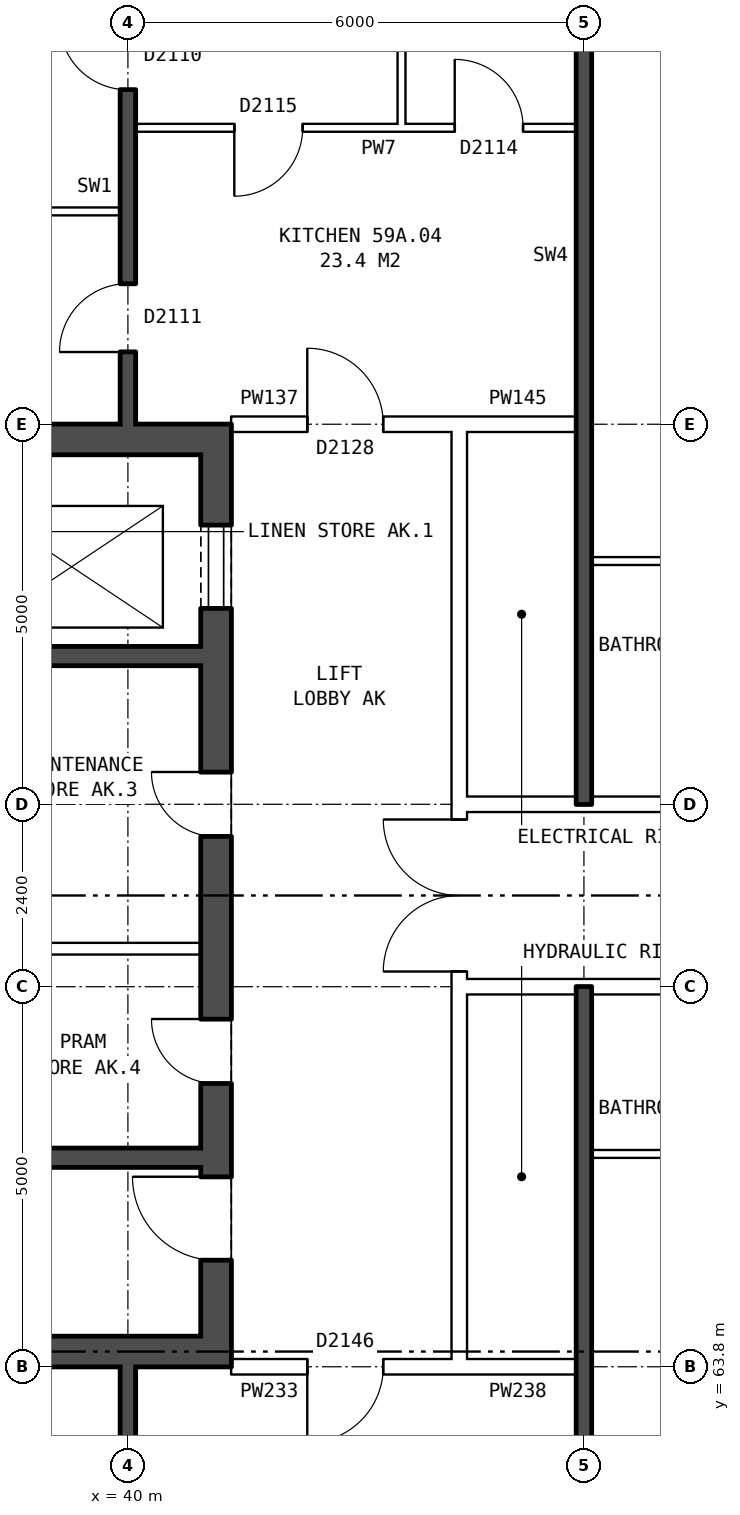
"""IFC4 building model, lengths in metres.
Left out: names, types, materials, properties, quantities, classifications, styles, units other than length and angle.
Written with IfcOpenShell. Run it as: python <this file> out.ifc"""

import sys

from ifc_helpers import new_model, si_unit, direction, frame, frame_2d, origin, place, context, subcontext, project, spatial, rectangle, extrude, element, fill, save


model = new_model("IFC4")
c1 = context("Model", 3, precision=1e-05, world=origin(), true_north=direction((0.0, 1.0)))
c2 = subcontext(c1, "Body", "Model", "MODEL_VIEW")
j1 = project(units=[si_unit("LENGTHUNIT", "METRE"), si_unit("PLANEANGLEUNIT", "RADIAN")], contexts=[c1])
p1 = place(None, origin())
s1 = spatial("IfcSite", under=j1, at=p1, CompositionType="ELEMENT")
p2 = place(p1, origin())
s2 = spatial("IfcBuilding", under=s1, at=p2, CompositionType="ELEMENT")
p3 = place(p2, frame((0.0, 0.0, 209.0)))
s3 = spatial("IfcBuildingStorey", under=s2, at=p3, CompositionType="ELEMENT", Elevation=209.0)
p4 = place(p3, frame((41.16, 76.2, 0.0), z_axis=(0.0, 0.0, 1.0), x_axis=(0.0, -1.0, 0.0)))
e1 = element("IfcWall", 1, at=p4, inside=s3, PredefinedType="SHEAR", context=c2, shape_type="SweptSolid", body=[
    extrude(rectangle(XDim=12.4, YDim=0.4, at=frame_2d((6.2, 0.0))), origin(), (0.0, 0.0, 1.0), 2.85),
])
p5 = place(p4, frame((1.325, 0.0, 0.0)))
e2 = element("IfcOpeningElement", 2, at=p5, cuts=e1, PredefinedType="OPENING", context=c2, shape_type="SweptSolid", body=[
    extrude(rectangle(XDim=1.1, YDim=2.1, at=frame_2d((0.55, 1.05))), frame((0.0, 0.21, 0.0), z_axis=(0.0, -1.0, 0.0), x_axis=(1.0, 0.0, 0.0)), (0.0, 0.0, 1.0), 0.42),
])
p6 = place(p4, frame((4.575, 0.0, 0.0)))
e3 = element("IfcOpeningElement", 3, at=p6, cuts=e1, PredefinedType="OPENING", context=c2, shape_type="SweptSolid", body=[
    extrude(rectangle(XDim=0.85, YDim=2.1, at=frame_2d((0.425, 1.05))), frame((0.0, 0.21, 0.0), z_axis=(0.0, -1.0, 0.0), x_axis=(1.0, 0.0, 0.0)), (0.0, 0.0, 1.0), 0.42),
])
p7 = place(p4, frame((7.825, 0.0, 0.0)))
e4 = element("IfcOpeningElement", 4, at=p7, cuts=e1, PredefinedType="OPENING", context=c2, shape_type="SweptSolid", body=[
    extrude(rectangle(XDim=0.85, YDim=2.1, at=frame_2d((0.425, 1.05))), frame((0.0, 0.21, 0.0), z_axis=(0.0, -1.0, 0.0), x_axis=(1.0, 0.0, 0.0)), (0.0, 0.0, 1.0), 0.42),
])
p8 = place(p4, frame((9.9, 0.0, 0.0)))
e5 = element("IfcOpeningElement", 5, at=p8, cuts=e1, PredefinedType="OPENING", context=c2, shape_type="SweptSolid", body=[
    extrude(rectangle(XDim=1.1, YDim=2.1, at=frame_2d((0.55, 1.05))), frame((0.0, 0.21, 0.0), z_axis=(0.0, -1.0, 0.0), x_axis=(1.0, 0.0, 0.0)), (0.0, 0.0, 1.0), 0.42),
])
for number, where, z_axis, x_axis in (
    (6, (40.96, 76.0, 0.0), (0.0, 0.0, 1.0), (-1.0, 0.0, 0.0)),
    (7, (40.96, 64.0, 0.0), (0.0, 0.0, 1.0), (-1.0, 0.0, 0.0)),
):
    element("IfcWall", number, at=place(p3, frame(where, z_axis=z_axis, x_axis=x_axis)), inside=s3, PredefinedType="SHEAR", context=c2, shape_type="SweptSolid", body=[
        extrude(rectangle(XDim=8.2, YDim=0.4, at=frame_2d((4.1, 0.0))), origin(), (0.0, 0.0, 1.0), 2.85),
    ])
p9 = place(p3, frame((40.96, 73.15, 0.0), z_axis=(0.0, 0.0, 1.0), x_axis=(-1.0, 0.0, 0.0)))
e8 = element("IfcWall", 8, at=p9, inside=s3, PredefinedType="SHEAR", context=c2, shape_type="SweptSolid", body=[
    extrude(rectangle(XDim=3.595, YDim=0.25, at=frame_2d((1.797, 0.0))), origin(), (0.0, 0.0, 1.0), 2.85),
])
p10 = place(p3, frame((40.96, 69.3, 0.0), z_axis=(0.0, 0.0, 1.0), x_axis=(-1.0, 0.0, 0.0)))
e9 = element("IfcWall", 9, at=p10, inside=s3, PredefinedType="PARTITIONING", context=c2, shape_type="SweptSolid", body=[
    extrude(rectangle(XDim=2.525, YDim=0.15, at=frame_2d((1.262, 0.0))), origin(), (0.0, 0.0, 1.0), 2.85),
])
p11 = place(p3, frame((40.96, 66.55, 0.0), z_axis=(0.0, 0.0, 1.0), x_axis=(-1.0, 0.0, 0.0)))
e10 = element("IfcWall", 10, at=p11, inside=s3, PredefinedType="SHEAR", context=c2, shape_type="SweptSolid", body=[
    extrude(rectangle(XDim=2.525, YDim=0.25, at=frame_2d((1.262, 0.0))), origin(), (0.0, 0.0, 1.0), 2.85),
])
p12 = place(p3, frame((44.36, 63.9, 0.0), z_axis=(0.0, 0.0, 1.0), x_axis=(0.0, 1.0, 0.0)))
e11 = element("IfcWall", 11, at=p12, inside=s3, PredefinedType="PARTITIONING", context=c2, shape_type="SweptSolid", body=[
    extrude(rectangle(XDim=12.2, YDim=0.2, at=frame_2d((6.1, 0.0))), origin(), (0.0, 0.0, 1.0), 2.85),
])
p13 = place(p12, frame((5.1, 0.0, 0.0)))
e12 = element("IfcOpeningElement", 12, at=p13, cuts=e11, PredefinedType="OPENING", context=c2, shape_type="SweptSolid", body=[
    extrude(rectangle(XDim=2.0, YDim=2.1, at=frame_2d((1.0, 1.05))), frame((0.0, 0.11, 0.0), z_axis=(0.0, -1.0, 0.0), x_axis=(1.0, 0.0, 0.0)), (0.0, 0.0, 1.0), 0.22),
])
p14 = place(p3, frame((41.36, 63.8, 0.0), z_axis=(0.0, 0.0, 1.0), x_axis=(1.0, 0.0, 0.0)))
e13 = element("IfcWall", 13, at=p14, inside=s3, PredefinedType="PARTITIONING", context=c2, shape_type="SweptSolid", body=[
    extrude(rectangle(XDim=3.0, YDim=0.2, at=frame_2d((1.5, 0.0))), origin(), (0.0, 0.0, 1.0), 2.85),
])
p15 = place(p14, frame((1.0, 0.0, 0.0)))
e14 = element("IfcOpeningElement", 14, at=p15, cuts=e13, PredefinedType="OPENING", context=c2, shape_type="SweptSolid", body=[
    extrude(rectangle(XDim=1.0, YDim=2.1, at=frame_2d((0.5, 1.05))), frame((0.0, 0.11, 0.0), z_axis=(0.0, -1.0, 0.0), x_axis=(1.0, 0.0, 0.0)), (0.0, 0.0, 1.0), 0.22),
])
p16 = place(p3, frame((44.36, 63.8, 0.0), z_axis=(0.0, 0.0, 1.0), x_axis=(1.0, 0.0, 0.0)))
e15 = element("IfcWall", 15, at=p16, inside=s3, PredefinedType="PARTITIONING", context=c2, shape_type="SweptSolid", body=[
    extrude(rectangle(XDim=1.54, YDim=0.2, at=frame_2d((0.77, 0.0))), origin(), (0.0, 0.0, 1.0), 2.85),
])
p17 = place(p3, frame((46.1, 66.6, 0.0), z_axis=(0.0, 0.0, 1.0), x_axis=(1.0, 0.0, 0.0)))
e16 = element("IfcWall", 16, at=p17, inside=s3, PredefinedType="PARTITIONING", context=c2, shape_type="SweptSolid", body=[
    extrude(rectangle(XDim=2.9, YDim=0.1, at=frame_2d((1.45, 0.0))), origin(), (0.0, 0.0, 1.0), 2.85),
])
p18 = place(p3, frame((44.36, 68.8, 0.0), z_axis=(0.0, 0.0, 1.0), x_axis=(1.0, 0.0, 0.0)))
e17 = element("IfcWall", 17, at=p18, inside=s3, PredefinedType="PARTITIONING", context=c2, shape_type="SweptSolid", body=[
    extrude(rectangle(XDim=19.28, YDim=0.2, at=frame_2d((9.64, 0.0))), origin(), (0.0, 0.0, 1.0), 2.85),
])
p19 = place(p18, frame((14.64, 0.0, 0.0)))
e18 = element("IfcOpeningElement", 18, at=p19, cuts=e17, PredefinedType="OPENING", context=c2, shape_type="SweptSolid", body=[
    extrude(rectangle(XDim=1.0, YDim=2.1, at=frame_2d((0.5, 1.05))), frame((0.0, 0.11, 0.0), z_axis=(0.0, -1.0, 0.0), x_axis=(1.0, 0.0, 0.0)), (0.0, 0.0, 1.0), 0.22),
])
p20 = place(p18, frame((5.64, 0.0, 0.0)))
e19 = element("IfcOpeningElement", 19, at=p20, cuts=e17, PredefinedType="OPENING", context=c2, shape_type="SweptSolid", body=[
    extrude(rectangle(XDim=1.0, YDim=2.1, at=frame_2d((0.5, 1.05))), frame((0.0, 0.11, 0.0), z_axis=(0.0, -1.0, 0.0), x_axis=(1.0, 0.0, 0.0)), (0.0, 0.0, 1.0), 0.22),
])
p21 = place(p3, frame((44.36, 71.2, 0.0), z_axis=(0.0, 0.0, 1.0), x_axis=(1.0, 0.0, 0.0)))
e20 = element("IfcWall", 20, at=p21, inside=s3, PredefinedType="PARTITIONING", context=c2, shape_type="SweptSolid", body=[
    extrude(rectangle(XDim=19.28, YDim=0.2, at=frame_2d((9.64, 0.0))), origin(), (0.0, 0.0, 1.0), 2.85),
])
p22 = place(p21, frame((14.64, 0.0, 0.0)))
e21 = element("IfcOpeningElement", 21, at=p22, cuts=e20, PredefinedType="OPENING", context=c2, shape_type="SweptSolid", body=[
    extrude(rectangle(XDim=1.0, YDim=2.1, at=frame_2d((0.5, 1.05))), frame((0.0, 0.11, 0.0), z_axis=(0.0, -1.0, 0.0), x_axis=(1.0, 0.0, 0.0)), (0.0, 0.0, 1.0), 0.22),
])
p23 = place(p21, frame((5.64, 0.0, 0.0)))
e22 = element("IfcOpeningElement", 22, at=p23, cuts=e20, PredefinedType="OPENING", context=c2, shape_type="SweptSolid", body=[
    extrude(rectangle(XDim=1.0, YDim=2.1, at=frame_2d((0.5, 1.05))), frame((0.0, 0.11, 0.0), z_axis=(0.0, -1.0, 0.0), x_axis=(1.0, 0.0, 0.0)), (0.0, 0.0, 1.0), 0.22),
])
p24 = place(p3, frame((46.1, 74.4, 0.0), z_axis=(0.0, 0.0, 1.0), x_axis=(1.0, 0.0, 0.0)))
e23 = element("IfcWall", 23, at=p24, inside=s3, PredefinedType="PARTITIONING", context=c2, shape_type="SweptSolid", body=[
    extrude(rectangle(XDim=2.9, YDim=0.1, at=frame_2d((1.45, 0.0))), origin(), (0.0, 0.0, 1.0), 2.85),
])
p25 = place(p3, frame((41.36, 76.2, 0.0), z_axis=(0.0, 0.0, 1.0), x_axis=(1.0, 0.0, 0.0)))
e24 = element("IfcWall", 24, at=p25, inside=s3, PredefinedType="PARTITIONING", context=c2, shape_type="SweptSolid", body=[
    extrude(rectangle(XDim=3.0, YDim=0.2, at=frame_2d((1.5, 0.0))), origin(), (0.0, 0.0, 1.0), 2.85),
])
p26 = place(p25, frame((1.0, 0.0, 0.0)))
e25 = element("IfcOpeningElement", 25, at=p26, cuts=e24, PredefinedType="OPENING", context=c2, shape_type="SweptSolid", body=[
    extrude(rectangle(XDim=1.0, YDim=2.1, at=frame_2d((0.5, 1.05))), frame((0.0, 0.11, 0.0), z_axis=(0.0, -1.0, 0.0), x_axis=(1.0, 0.0, 0.0)), (0.0, 0.0, 1.0), 0.22),
])
p27 = place(p3, frame((44.36, 76.2, 0.0), z_axis=(0.0, 0.0, 1.0), x_axis=(1.0, 0.0, 0.0)))
e26 = element("IfcWall", 26, at=p27, inside=s3, PredefinedType="PARTITIONING", context=c2, shape_type="SweptSolid", body=[
    extrude(rectangle(XDim=1.54, YDim=0.2, at=frame_2d((0.77, 0.0))), origin(), (0.0, 0.0, 1.0), 2.85),
])
p28 = place(p3, frame((32.36, 79.0, 0.0), z_axis=(0.0, 0.0, 1.0), x_axis=(1.0, 0.0, 0.0)))
e27 = element("IfcWall", 27, at=p28, inside=s3, PredefinedType="PARTITIONING", context=c2, shape_type="SweptSolid", body=[
    extrude(rectangle(XDim=7.54, YDim=0.1, at=frame_2d((3.77, 0.0))), origin(), (0.0, 0.0, 1.0), 2.85),
])
p29 = place(p3, frame((40.1, 80.1, 0.0), z_axis=(0.0, 0.0, 1.0), x_axis=(1.0, 0.0, 0.0)))
e28 = element("IfcWall", 28, at=p29, inside=s3, PredefinedType="PARTITIONING", context=c2, shape_type="SweptSolid", body=[
    extrude(rectangle(XDim=5.8, YDim=0.1, at=frame_2d((2.9, 0.0))), origin(), (0.0, 0.0, 1.0), 2.85),
])
p30 = place(p29, frame((1.3, 0.0, 0.0)))
e29 = element("IfcOpeningElement", 29, at=p30, cuts=e28, PredefinedType="OPENING", context=c2, shape_type="SweptSolid", body=[
    extrude(rectangle(XDim=0.9, YDim=2.1, at=frame_2d((0.45, 1.05))), frame((0.0, 0.06, 0.0), z_axis=(0.0, -1.0, 0.0), x_axis=(1.0, 0.0, 0.0)), (0.0, 0.0, 1.0), 0.12),
])
p31 = place(p29, frame((4.2, 0.0, 0.0)))
e30 = element("IfcOpeningElement", 30, at=p31, cuts=e28, PredefinedType="OPENING", context=c2, shape_type="SweptSolid", body=[
    extrude(rectangle(XDim=0.9, YDim=2.1, at=frame_2d((0.45, 1.05))), frame((0.0, 0.06, 0.0), z_axis=(0.0, -1.0, 0.0), x_axis=(1.0, 0.0, 0.0)), (0.0, 0.0, 1.0), 0.12),
])
p32 = place(p3, frame((40.0, 54.36, 0.0), z_axis=(0.0, 0.0, 1.0), x_axis=(0.0, 1.0, 0.0)))
e31 = element("IfcWall", 31, at=p32, inside=s3, PredefinedType="SOLIDWALL", context=c2, shape_type="SweptSolid", body=[
    extrude(rectangle(XDim=9.44, YDim=0.2, at=frame_2d((4.72, 0.0))), origin(), (0.0, 0.0, 1.0), 2.85),
])
p33 = place(p32, frame((7.19, 0.0, 0.0)))
e32 = element("IfcOpeningElement", 32, at=p33, cuts=e31, PredefinedType="OPENING", context=c2, shape_type="SweptSolid", body=[
    extrude(rectangle(XDim=0.9, YDim=2.1, at=frame_2d((0.45, 1.05))), frame((0.0, 0.11, 0.0), z_axis=(0.0, -1.0, 0.0), x_axis=(1.0, 0.0, 0.0)), (0.0, 0.0, 1.0), 0.22),
])
p34 = place(p3, frame((40.0, 76.2, 0.0), z_axis=(0.0, 0.0, 1.0), x_axis=(0.0, 1.0, 0.0)))
e33 = element("IfcWall", 33, at=p34, inside=s3, PredefinedType="SOLIDWALL", context=c2, shape_type="SweptSolid", body=[
    extrude(rectangle(XDim=9.44, YDim=0.2, at=frame_2d((4.72, 0.0))), origin(), (0.0, 0.0, 1.0), 2.85),
])
p35 = place(p34, frame((7.17, 0.0, 0.0)))
e34 = element("IfcOpeningElement", 34, at=p35, cuts=e33, PredefinedType="OPENING", context=c2, shape_type="SweptSolid", body=[
    extrude(rectangle(XDim=0.9, YDim=2.1, at=frame_2d((0.45, 1.05))), frame((0.0, 0.11, 0.0), z_axis=(0.0, -1.0, 0.0), x_axis=(1.0, 0.0, 0.0)), (0.0, 0.0, 1.0), 0.22),
])
p36 = place(p34, frame((4.4, 0.0, 0.0)))
e35 = element("IfcOpeningElement", 35, at=p36, cuts=e33, PredefinedType="OPENING", context=c2, shape_type="SweptSolid", body=[
    extrude(rectangle(XDim=0.9, YDim=2.1, at=frame_2d((0.45, 1.05))), frame((0.0, 0.11, 0.0), z_axis=(0.0, -1.0, 0.0), x_axis=(1.0, 0.0, 0.0)), (0.0, 0.0, 1.0), 0.22),
])
p37 = place(p34, frame((0.95, 0.0, 0.0)))
e36 = element("IfcOpeningElement", 36, at=p37, cuts=e33, PredefinedType="OPENING", context=c2, shape_type="SweptSolid", body=[
    extrude(rectangle(XDim=0.9, YDim=2.1, at=frame_2d((0.45, 1.05))), frame((0.0, 0.11, 0.0), z_axis=(0.0, -1.0, 0.0), x_axis=(1.0, 0.0, 0.0)), (0.0, 0.0, 1.0), 0.22),
])
p38 = place(p3, frame((43.6, 80.15, 0.0), z_axis=(0.0, 0.0, 1.0), x_axis=(0.0, 1.0, 0.0)))
e37 = element("IfcWall", 37, at=p38, inside=s3, PredefinedType="PARTITIONING", context=c2, shape_type="SweptSolid", body=[
    extrude(rectangle(XDim=2.4, YDim=0.1, at=frame_2d((1.2, 0.0))), origin(), (0.0, 0.0, 1.0), 2.85),
])
for number, where, z_axis, x_axis in (
    (38, (46.0, 54.36, 0.0), (0.0, 0.0, 1.0), (0.0, 1.0, 0.0)),
    (39, (46.0, 71.2, 0.0), (0.0, 0.0, 1.0), (0.0, 1.0, 0.0)),
):
    element("IfcWall", number, at=place(p3, frame(where, z_axis=z_axis, x_axis=x_axis)), inside=s3, PredefinedType="SOLIDWALL", context=c2, shape_type="SweptSolid", body=[
        extrude(rectangle(XDim=14.44, YDim=0.2, at=frame_2d((7.22, 0.0))), origin(), (0.0, 0.0, 1.0), 2.85),
    ])
p39 = place(p5, origin())
e40 = element("IfcDoor", 40, at=p39, inside=s3, OperationType="DOUBLE_DOOR_SLIDING", PredefinedType="DOOR", context=c2, shape_type="SweptSolid", body=[
    extrude(rectangle(XDim=1.1, YDim=2.1, at=frame_2d((0.55, 1.05))), frame((0.0, -0.135, 0.0), z_axis=(0.0, -1.0, 0.0), x_axis=(1.0, 0.0, 0.0)), (0.0, 0.0, 1.0), 0.05),
])
fill(e2, e40)
p40 = place(p6, frame((0.85, 0.0, 0.0), z_axis=(0.0, 0.0, 1.0), x_axis=(-1.0, 0.0, 0.0)))
e41 = element("IfcDoor", 41, at=p40, inside=s3, OperationType="SINGLE_SWING_RIGHT", PredefinedType="DOOR", context=c2, shape_type="SweptSolid", body=[
    extrude(rectangle(XDim=0.85, YDim=2.1, at=frame_2d((0.425, 1.05))), frame((0.0, 0.185, 0.0), z_axis=(0.0, -1.0, 0.0), x_axis=(1.0, 0.0, 0.0)), (0.0, 0.0, 1.0), 0.05),
])
fill(e3, e41)
p41 = place(p7, frame((0.85, 0.0, 0.0), z_axis=(0.0, 0.0, 1.0), x_axis=(-1.0, 0.0, 0.0)))
e42 = element("IfcDoor", 42, at=p41, inside=s3, OperationType="SINGLE_SWING_RIGHT", PredefinedType="DOOR", context=c2, shape_type="SweptSolid", body=[
    extrude(rectangle(XDim=0.85, YDim=2.1, at=frame_2d((0.425, 1.05))), frame((0.0, 0.185, 0.0), z_axis=(0.0, -1.0, 0.0), x_axis=(1.0, 0.0, 0.0)), (0.0, 0.0, 1.0), 0.05),
])
fill(e4, e42)
p42 = place(p8, frame((1.1, 0.0, 0.0), z_axis=(0.0, 0.0, 1.0), x_axis=(-1.0, 0.0, 0.0)))
e43 = element("IfcDoor", 43, at=p42, inside=s3, OperationType="SINGLE_SWING_RIGHT", PredefinedType="DOOR", context=c2, shape_type="SweptSolid", body=[
    extrude(rectangle(XDim=1.1, YDim=2.1, at=frame_2d((0.55, 1.05))), frame((0.0, 0.185, 0.0), z_axis=(0.0, -1.0, 0.0), x_axis=(1.0, 0.0, 0.0)), (0.0, 0.0, 1.0), 0.05),
])
fill(e5, e43)
p43 = place(p13, origin())
e44 = element("IfcDoor", 44, at=p43, inside=s3, OperationType="DOUBLE_DOOR_SINGLE_SWING", PredefinedType="DOOR", context=c2, shape_type="SweptSolid", body=[
    extrude(rectangle(XDim=2.0, YDim=2.1, at=frame_2d((1.0, 1.05))), frame((0.0, 0.025, 0.0), z_axis=(0.0, -1.0, 0.0), x_axis=(1.0, 0.0, 0.0)), (0.0, 0.0, 1.0), 0.05),
])
fill(e12, e44)
p44 = place(p15, frame((1.0, 0.0, 0.0), z_axis=(0.0, 0.0, 1.0), x_axis=(-1.0, 0.0, 0.0)))
e45 = element("IfcDoor", 45, at=p44, inside=s3, OperationType="SINGLE_SWING_RIGHT", PredefinedType="DOOR", context=c2, shape_type="SweptSolid", body=[
    extrude(rectangle(XDim=1.0, YDim=2.1, at=frame_2d((0.5, 1.05))), frame((0.0, 0.025, 0.0), z_axis=(0.0, -1.0, 0.0), x_axis=(1.0, 0.0, 0.0)), (0.0, 0.0, 1.0), 0.05),
])
fill(e14, e45)
p45 = place(p36, origin())
e46 = element("IfcDoor", 46, at=p45, inside=s3, OperationType="SINGLE_SWING_RIGHT", PredefinedType="DOOR", context=c2, shape_type="SweptSolid", body=[
    extrude(rectangle(XDim=0.9, YDim=2.1, at=frame_2d((0.45, 1.05))), frame((0.0, 0.025, 0.0), z_axis=(0.0, -1.0, 0.0), x_axis=(1.0, 0.0, 0.0)), (0.0, 0.0, 1.0), 0.05),
])
fill(e35, e46)
p46 = place(p37, origin())
e47 = element("IfcDoor", 47, at=p46, inside=s3, OperationType="SINGLE_SWING_LEFT", PredefinedType="DOOR", context=c2, shape_type="SweptSolid", body=[
    extrude(rectangle(XDim=0.9, YDim=2.1, at=frame_2d((0.45, 1.05))), frame((0.0, 0.025, 0.0), z_axis=(0.0, -1.0, 0.0), x_axis=(1.0, 0.0, 0.0)), (0.0, 0.0, 1.0), 0.05),
])
fill(e36, e47)
p47 = place(p26, origin())
e48 = element("IfcDoor", 48, at=p47, inside=s3, OperationType="SINGLE_SWING_LEFT", PredefinedType="DOOR", context=c2, shape_type="SweptSolid", body=[
    extrude(rectangle(XDim=1.0, YDim=2.1, at=frame_2d((0.5, 1.05))), frame((0.0, 0.025, 0.0), z_axis=(0.0, -1.0, 0.0), x_axis=(1.0, 0.0, 0.0)), (0.0, 0.0, 1.0), 0.05),
])
fill(e25, e48)
p48 = place(p30, frame((0.9, 0.0, 0.0), z_axis=(0.0, 0.0, 1.0), x_axis=(-1.0, 0.0, 0.0)))
e49 = element("IfcDoor", 49, at=p48, inside=s3, OperationType="SINGLE_SWING_RIGHT", PredefinedType="DOOR", context=c2, shape_type="SweptSolid", body=[
    extrude(rectangle(XDim=0.9, YDim=2.1, at=frame_2d((0.45, 1.05))), frame((0.0, 0.025, 0.0), z_axis=(0.0, -1.0, 0.0), x_axis=(1.0, 0.0, 0.0)), (0.0, 0.0, 1.0), 0.05),
])
fill(e29, e49)
p49 = place(p31, origin())
e50 = element("IfcDoor", 50, at=p49, inside=s3, OperationType="SINGLE_SWING_LEFT", PredefinedType="DOOR", context=c2, shape_type="SweptSolid", body=[
    extrude(rectangle(XDim=0.9, YDim=2.1, at=frame_2d((0.45, 1.05))), frame((0.0, 0.025, 0.0), z_axis=(0.0, -1.0, 0.0), x_axis=(1.0, 0.0, 0.0)), (0.0, 0.0, 1.0), 0.05),
])
fill(e30, e50)
save(model, sys.argv[1])
